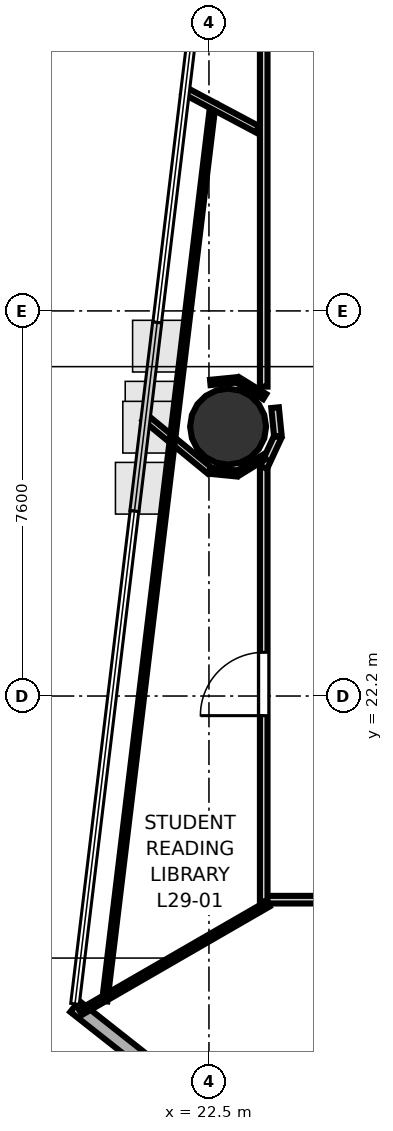
"""IFC4 building model, lengths in metres.
Left out: names, types, materials, properties, quantities, classifications, styles, units other than length and angle.
Written with IfcOpenShell. Run it as: python <this file> out.ifc"""

import sys

from ifc_helpers import new_model, si_unit, direction, frame, frame_2d, origin, origin_2d, place, context, subcontext, project, spatial, rectangle, hollow_circle, extrude, element, fill, save


model = new_model("IFC4")
c1 = context("Model", 3, precision=1e-05, world=origin(), true_north=direction((0.0, 1.0)))
c2 = subcontext(c1, "Body", "Model", "MODEL_VIEW")
j1 = project(units=[si_unit("LENGTHUNIT", "METRE"), si_unit("PLANEANGLEUNIT", "RADIAN")], contexts=[c1])
p1 = place(None, origin())
s1 = spatial("IfcSite", under=j1, at=p1, CompositionType="ELEMENT")
p2 = place(p1, origin())
s2 = spatial("IfcBuilding", under=s1, at=p2, CompositionType="ELEMENT")
p3 = place(p2, frame((0.0, 0.0, 116.3)))
s3 = spatial("IfcBuildingStorey", under=s2, at=p3, CompositionType="ELEMENT", Elevation=116.3)
p4 = place(p3, frame((22.878, 27.516, 0.0), z_axis=(0.0, 0.0, 1.0), x_axis=(1.0, 0.0, 0.0)))
e1 = element("IfcColumn", 1, at=p4, inside=s3, PredefinedType="COLUMN", context=c2, shape_type="SweptSolid", body=[
    extrude(hollow_circle(Radius=0.75, WallThickness=0.036, at=origin_2d()), origin(), (0.0, 0.0, 1.0), 3.7),
])
p5 = place(p3, frame((19.85, 16.076, 0.0), z_axis=(0.0, 0.0, 1.0), x_axis=(0.785148009035, -0.619308165543, 0.0)))
e2 = element("IfcWall", 2, at=p5, inside=s3, PredefinedType="SOLIDWALL", context=c2, shape_type="SweptSolid", body=[
    extrude(rectangle(XDim=10.27, YDim=0.28, at=frame_2d((5.135, 0.0))), origin(), (0.0, 0.0, 1.0), 3.52),
])
p6 = place(p5, frame((2.331, 0.0, 0.85)))
e3 = element("IfcOpeningElement", 3, at=p6, cuts=e2, PredefinedType="OPENING", context=c2, shape_type="SweptSolid", body=[
    extrude(rectangle(XDim=1.5, YDim=2.1, at=frame_2d((0.75, 1.05))), frame((0.0, 0.15, 0.0), z_axis=(0.0, -1.0, 0.0), x_axis=(1.0, 0.0, 0.0)), (0.0, 0.0, 1.0), 0.3),
])
p7 = place(p5, frame((5.799, 0.0, 0.85)))
e4 = element("IfcOpeningElement", 4, at=p7, cuts=e2, PredefinedType="OPENING", context=c2, shape_type="SweptSolid", body=[
    extrude(rectangle(XDim=1.5, YDim=2.1, at=frame_2d((0.75, 1.05))), frame((0.0, 0.15, 0.0), z_axis=(0.0, -1.0, 0.0), x_axis=(1.0, 0.0, 0.0)), (0.0, 0.0, 1.0), 0.3),
])
p8 = place(p3, frame((23.581, 28.307, 0.0), z_axis=(0.0, 0.0, 1.0), x_axis=(0.0, 1.0, 0.0)))
e5 = element("IfcWall", 5, at=p8, inside=s3, PredefinedType="PARTITIONING", context=c2, shape_type="SweptSolid", body=[
    extrude(rectangle(XDim=11.944, YDim=0.15, at=frame_2d((5.972, 0.0))), origin(), (0.0, 0.0, 1.0), 2.84),
])
p9 = place(p3, frame((33.32, 18.181, 0.0), z_axis=(0.0, 0.0, 1.0), x_axis=(-1.0, 0.0, 0.0)))
e6 = element("IfcWall", 6, at=p9, inside=s3, PredefinedType="PARTITIONING", context=c2, shape_type="SweptSolid", body=[
    extrude(rectangle(XDim=9.77, YDim=0.15, at=frame_2d((4.885, 0.0))), origin(), (0.0, 0.0, 1.0), 2.84),
])
p10 = place(p9, frame((6.156, 0.0, 0.0)))
e7 = element("IfcOpeningElement", 7, at=p10, cuts=e6, PredefinedType="OPENING", context=c2, shape_type="SweptSolid", body=[
    extrude(rectangle(XDim=1.25, YDim=2.2, at=frame_2d((0.625, 1.1))), frame((0.0, 0.085, 0.0), z_axis=(0.0, -1.0, 0.0), x_axis=(1.0, 0.0, 0.0)), (0.0, 0.0, 1.0), 0.17),
])
p11 = place(p3, frame((23.581, 18.15, 0.0), z_axis=(0.0, 0.0, 1.0), x_axis=(0.0, 1.0, 0.0)))
e8 = element("IfcWall", 8, at=p11, inside=s3, PredefinedType="PARTITIONING", context=c2, shape_type="SweptSolid", body=[
    extrude(rectangle(XDim=8.575, YDim=0.15, at=frame_2d((4.288, 0.0))), origin(), (0.0, 0.0, 1.0), 2.84),
])
p12 = place(p11, frame((3.663, 0.0, 0.0)))
e9 = element("IfcOpeningElement", 9, at=p12, cuts=e8, PredefinedType="OPENING", context=c2, shape_type="SweptSolid", body=[
    extrude(rectangle(XDim=1.25, YDim=2.2, at=frame_2d((0.625, 1.1))), frame((0.0, 0.085, 0.0), z_axis=(0.0, -1.0, 0.0), x_axis=(1.0, 0.0, 0.0)), (0.0, 0.0, 1.0), 0.17),
])
p13 = place(p3, frame((23.578, 26.712, 0.0), z_axis=(0.0, 0.0, 1.0), x_axis=(0.421251946418, 0.906943657367, 0.0)))
e10 = element("IfcWall", 10, at=p13, inside=s3, PredefinedType="PARTITIONING", context=c2, shape_type="SweptSolid", body=[
    extrude(rectangle(XDim=0.663, YDim=0.15, at=frame_2d((0.332, 0.0))), origin(), (0.0, 0.0, 1.0), 2.84),
])
p14 = place(p3, frame((23.86, 27.33, 0.0), z_axis=(0.0, 0.0, 1.0), x_axis=(-0.098000919071, 0.995186324193, 0.0)))
e11 = element("IfcWall", 11, at=p14, inside=s3, PredefinedType="PARTITIONING", context=c2, shape_type="SweptSolid", body=[
    extrude(rectangle(XDim=0.563, YDim=0.15, at=frame_2d((0.281, 0.0))), origin(), (0.0, 0.0, 1.0), 2.84),
])
p15 = place(p3, frame((23.6, 28.11, 0.0), z_axis=(0.0, 0.0, 1.0), x_axis=(-0.851712341449, 0.524009625316, 0.0)))
e12 = element("IfcWall", 12, at=p15, inside=s3, PredefinedType="PARTITIONING", context=c2, shape_type="SweptSolid", body=[
    extrude(rectangle(XDim=0.621, YDim=0.12, at=frame_2d((0.31, 0.0))), origin(), (0.0, 0.0, 1.0), 2.84),
])
p16 = place(p3, frame((23.052, 28.439, 0.0), z_axis=(0.0, 0.0, 1.0), x_axis=(-0.995191506225, -0.09794828195, 0.0)))
e13 = element("IfcWall", 13, at=p16, inside=s3, PredefinedType="PARTITIONING", context=c2, shape_type="SweptSolid", body=[
    extrude(rectangle(XDim=0.528, YDim=0.105, at=frame_2d((0.264, 0.0))), origin(), (0.0, 0.0, 1.0), 2.84),
])
p17 = place(p3, frame((21.236, 27.697, 0.0), z_axis=(0.0, 0.0, 1.0), x_axis=(0.773006334928, -0.634398302458, 0.0)))
e14 = element("IfcWall", 14, at=p17, inside=s3, PredefinedType="PARTITIONING", context=c2, shape_type="SweptSolid", body=[
    extrude(rectangle(XDim=1.649, YDim=0.14, at=frame_2d((0.824, 0.0))), origin(), (0.0, 0.0, 1.0), 2.84),
])
p18 = place(p3, frame((22.527, 26.644, 0.0), z_axis=(0.0, 0.0, 1.0), x_axis=(0.995191506225, -0.09794828195, 0.0)))
e15 = element("IfcWall", 15, at=p18, inside=s3, PredefinedType="PARTITIONING", context=c2, shape_type="SweptSolid", body=[
    extrude(rectangle(XDim=0.528, YDim=0.12, at=frame_2d((0.264, 0.0))), origin(), (0.0, 0.0, 1.0), 2.84),
])
p19 = place(p3, frame((23.072, 26.597, 0.0), z_axis=(0.0, 0.0, 1.0), x_axis=(0.851536753009, 0.524294915363, 0.0)))
e16 = element("IfcWall", 16, at=p19, inside=s3, PredefinedType="PARTITIONING", context=c2, shape_type="SweptSolid", body=[
    extrude(rectangle(XDim=0.621, YDim=0.105, at=frame_2d((0.31, 0.0))), origin(), (0.0, 0.0, 1.0), 2.84),
])
p20 = place(p3, frame((23.665, 18.097, 0.0), z_axis=(0.0, 0.0, 1.0), x_axis=(-0.866050431771, -0.49995664775, 0.0)))
e17 = element("IfcWall", 17, at=p20, inside=s3, PredefinedType="PARTITIONING", context=c2, shape_type="SweptSolid", body=[
    extrude(rectangle(XDim=4.271, YDim=0.12, at=frame_2d((2.136, 0.0))), origin(), (0.0, 0.0, 1.0), 2.84),
])
p21 = place(p3, frame((20.443, 16.179, 0.0), z_axis=(0.0, 0.0, 1.0), x_axis=(0.11977901292, 0.992800578195, 0.0)))
e18 = element("IfcWall", 18, at=p21, inside=s3, PredefinedType="PARTITIONING", context=c2, shape_type="SweptSolid", body=[
    extrude(rectangle(XDim=17.847, YDim=0.105, at=frame_2d((8.923, 0.0))), origin(), (0.0, 0.0, 1.0), 2.84),
])
p22 = place(p3, frame((22.013, 34.152, 0.0), z_axis=(0.0, 0.0, 1.0), x_axis=(0.882939604617, -0.469486586175, 0.0)))
e19 = element("IfcWall", 19, at=p22, inside=s3, PredefinedType="PARTITIONING", context=c2, shape_type="SweptSolid", body=[
    extrude(rectangle(XDim=1.634, YDim=0.14, at=frame_2d((0.817, 0.0))), origin(), (0.0, 0.0, 1.0), 2.84),
])
p23 = place(p12, origin())
e20 = element("IfcDoor", 20, at=p23, inside=s3, OperationType="SINGLE_SWING_LEFT", PredefinedType="DOOR", context=c2, shape_type="SweptSolid", body=[
    extrude(rectangle(XDim=1.25, YDim=2.2, at=frame_2d((0.625, 1.1))), frame((0.0, 0.025, 0.0), z_axis=(0.0, -1.0, 0.0), x_axis=(1.0, 0.0, 0.0)), (0.0, 0.0, 1.0), 0.05),
])
fill(e9, e20)
save(model, sys.argv[1])
